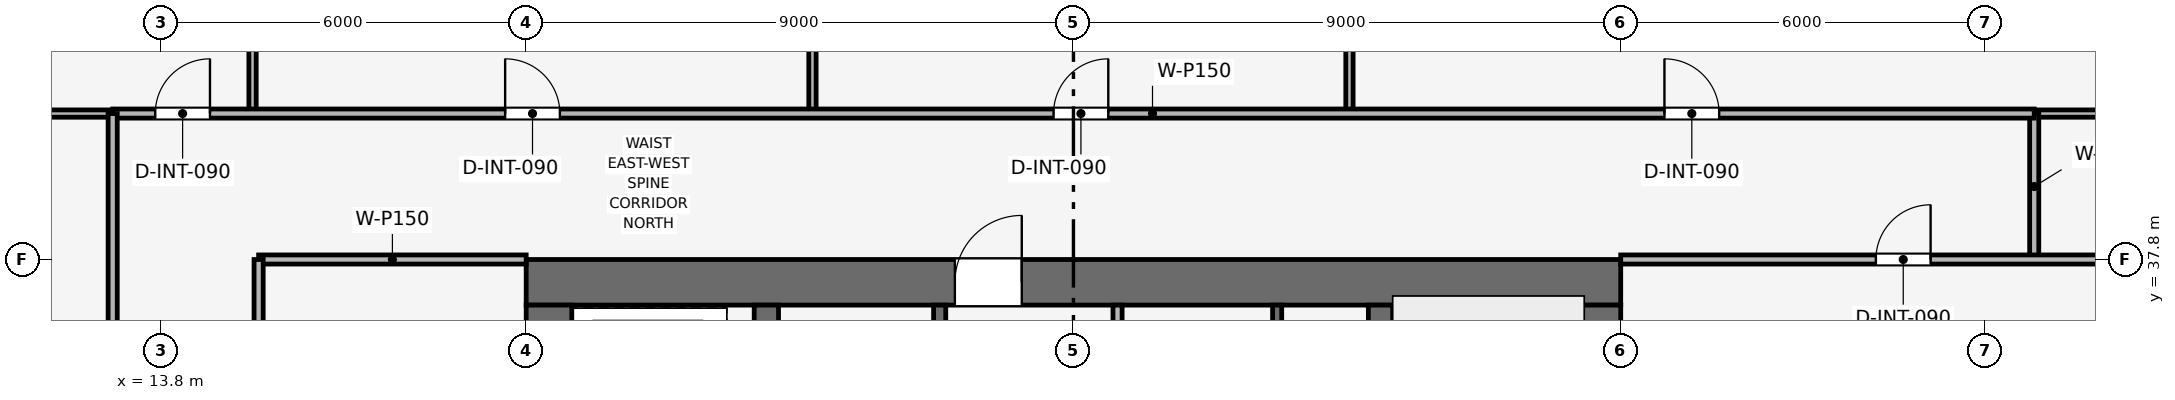
"""IFC4 building model, lengths in metres.
Left out: names, types, materials, properties, quantities, classifications, styles, units other than length and angle.
Written with IfcOpenShell. Run it as: python <this file> out.ifc"""

import sys

from ifc_helpers import new_model, si_unit, direction, frame, frame_2d, origin, place, context, subcontext, project, spatial, rectangle, extrude, element, fill, save


model = new_model("IFC4")
c1 = context("Model", 3, precision=1e-05, world=origin(), true_north=direction((0.0, 1.0)))
c2 = subcontext(c1, "Body", "Model", "MODEL_VIEW")
j1 = project(units=[si_unit("LENGTHUNIT", "METRE"), si_unit("PLANEANGLEUNIT", "RADIAN")], contexts=[c1])
p1 = place(None, origin())
s1 = spatial("IfcSite", under=j1, at=p1, CompositionType="ELEMENT")
p2 = place(p1, origin())
s2 = spatial("IfcBuilding", under=s1, at=p2, CompositionType="ELEMENT")
p3 = place(p2, frame((0.0, 0.0, 203.7)))
s3 = spatial("IfcBuildingStorey", under=s2, at=p3, CompositionType="ELEMENT", Elevation=203.7)
p4 = place(p3, frame((19.8, 37.425, 0.0), z_axis=(0.0, 0.0, 1.0), x_axis=(1.0, 0.0, 0.0)))
e1 = element("IfcWall", 1, at=p4, inside=s3, PredefinedType="SHEAR", context=c2, shape_type="SweptSolid", body=[
    extrude(rectangle(XDim=18.0, YDim=0.75, at=frame_2d((9.0, 0.0))), origin(), (0.0, 0.0, 1.0), 3.75),
])
p5 = place(p4, frame((7.05, 0.0, 0.0)))
e2 = element("IfcOpeningElement", 2, at=p5, cuts=e1, PredefinedType="OPENING", context=c2, shape_type="SweptSolid", body=[
    extrude(rectangle(XDim=1.1, YDim=2.15, at=frame_2d((0.55, 1.075))), frame((0.0, 0.385, 0.0), z_axis=(0.0, -1.0, 0.0), x_axis=(1.0, 0.0, 0.0)), (0.0, 0.0, 1.0), 0.77),
])
p6 = place(p3, frame((20.175, 20.55, 0.0), z_axis=(0.0, 0.0, 1.0), x_axis=(0.0, 1.0, 0.0)))
e3 = element("IfcWall", 3, at=p6, inside=s3, PredefinedType="SHEAR", context=c2, shape_type="SweptSolid", body=[
    extrude(rectangle(XDim=16.5, YDim=0.75, at=frame_2d((8.25, 0.0))), origin(), (0.0, 0.0, 1.0), 3.75),
])
p7 = place(p6, frame((10.25, 0.0, 0.0)))
e4 = element("IfcOpeningElement", 4, at=p7, cuts=e3, PredefinedType="OPENING", context=c2, shape_type="SweptSolid", body=[
    extrude(rectangle(XDim=1.1, YDim=2.15, at=frame_2d((0.55, 1.075))), frame((0.0, 0.385, 0.0), z_axis=(0.0, -1.0, 0.0), x_axis=(1.0, 0.0, 0.0)), (0.0, 0.0, 1.0), 0.77),
])
p8 = place(p3, frame((37.425, 20.55, 0.0), z_axis=(0.0, 0.0, 1.0), x_axis=(0.0, 1.0, 0.0)))
e5 = element("IfcWall", 5, at=p8, inside=s3, PredefinedType="SHEAR", context=c2, shape_type="SweptSolid", body=[
    extrude(rectangle(XDim=16.5, YDim=0.75, at=frame_2d((8.25, 0.0))), origin(), (0.0, 0.0, 1.0), 3.75),
])
p9 = place(p8, frame((4.75, 0.0, 0.0)))
e6 = element("IfcOpeningElement", 6, at=p9, cuts=e5, PredefinedType="OPENING", context=c2, shape_type="SweptSolid", body=[
    extrude(rectangle(XDim=1.1, YDim=2.15, at=frame_2d((0.55, 1.075))), frame((0.0, 0.385, 0.0), z_axis=(0.0, -1.0, 0.0), x_axis=(1.0, 0.0, 0.0)), (0.0, 0.0, 1.0), 0.77),
])
for number, where, z_axis, x_axis in (
    (7, (23.75, 20.55, 0.0), (0.0, 0.0, 1.0), (0.0, 1.0, 0.0)),
    (8, (33.85, 20.55, 0.0), (0.0, 0.0, 1.0), (0.0, 1.0, 0.0)),
):
    element("IfcWall", number, at=place(p3, frame(where, z_axis=z_axis, x_axis=x_axis)), inside=s3, PredefinedType="SHEAR", context=c2, shape_type="SweptSolid", body=[
        extrude(rectangle(XDim=16.5, YDim=0.4, at=frame_2d((8.25, 0.0))), origin(), (0.0, 0.0, 1.0), 3.75),
    ])
p10 = place(p3, frame((32.15, 34.0, 0.0), z_axis=(0.0, 0.0, 1.0), x_axis=(0.0, 1.0, 0.0)))
e9 = element("IfcWall", 9, at=p10, inside=s3, PredefinedType="SHEAR", context=c2, shape_type="SweptSolid", body=[
    extrude(rectangle(XDim=3.05, YDim=0.15, at=frame_2d((1.525, 0.0))), origin(), (0.0, 0.0, 1.0), 3.5),
])
p11 = place(p3, frame((26.6, 34.0, 0.0), z_axis=(0.0, 0.0, 1.0), x_axis=(0.0, 1.0, 0.0)))
e10 = element("IfcWall", 10, at=p11, inside=s3, PredefinedType="SHEAR", context=c2, shape_type="SweptSolid", body=[
    extrude(rectangle(XDim=3.05, YDim=0.2, at=frame_2d((1.525, 0.0))), origin(), (0.0, 0.0, 1.0), 3.5),
])
p12 = place(p11, frame((0.75, 0.0, 0.0)))
e11 = element("IfcOpeningElement", 11, at=p12, cuts=e10, PredefinedType="OPENING", context=c2, shape_type="SweptSolid", body=[
    extrude(rectangle(XDim=1.1, YDim=2.15, at=frame_2d((0.55, 1.075))), frame((0.0, 0.11, 0.0), z_axis=(0.0, -1.0, 0.0), x_axis=(1.0, 0.0, 0.0)), (0.0, 0.0, 1.0), 0.22),
])
p13 = place(p3, frame((29.525, 33.925, 0.0), z_axis=(0.0, 0.0, 1.0), x_axis=(0.0, 1.0, 0.0)))
e12 = element("IfcWall", 12, at=p13, inside=s3, PredefinedType="PARTITIONING", context=c2, shape_type="SweptSolid", body=[
    extrude(rectangle(XDim=3.125, YDim=0.15, at=frame_2d((1.562, 0.0))), origin(), (0.0, 0.0, 1.0), 3.5),
])
p14 = place(p13, frame((0.85, 0.0, 0.0)))
e13 = element("IfcOpeningElement", 13, at=p14, cuts=e12, PredefinedType="OPENING", context=c2, shape_type="SweptSolid", body=[
    extrude(rectangle(XDim=0.9, YDim=2.1, at=frame_2d((0.45, 1.05))), frame((0.0, 0.085, 0.0), z_axis=(0.0, -1.0, 0.0), x_axis=(1.0, 0.0, 0.0)), (0.0, 0.0, 1.0), 0.17),
])
p15 = place(p3, frame((15.4, 37.8, 0.0), z_axis=(0.0, 0.0, 1.0), x_axis=(1.0, 0.0, 0.0)))
e14 = element("IfcWall", 14, at=p15, inside=s3, PredefinedType="PARTITIONING", context=c2, shape_type="SweptSolid", body=[
    extrude(rectangle(XDim=4.4, YDim=0.15, at=frame_2d((2.2, 0.0))), origin(), (0.0, 0.0, 1.0), 3.035),
])
p16 = place(p3, frame((15.4, 32.45, 0.0), z_axis=(0.0, 0.0, 1.0), x_axis=(0.0, 1.0, 0.0)))
e15 = element("IfcWall", 15, at=p16, inside=s3, PredefinedType="PARTITIONING", context=c2, shape_type="SweptSolid", body=[
    extrude(rectangle(XDim=5.35, YDim=0.15, at=frame_2d((2.675, 0.0))), origin(), (0.0, 0.0, 1.0), 3.035),
])
p17 = place(p16, frame((2.1, 0.0, 0.0)))
e16 = element("IfcOpeningElement", 16, at=p17, cuts=e15, PredefinedType="OPENING", context=c2, shape_type="SweptSolid", body=[
    extrude(rectangle(XDim=0.9, YDim=2.1, at=frame_2d((0.45, 1.05))), frame((0.0, 0.085, 0.0), z_axis=(0.0, -1.0, 0.0), x_axis=(1.0, 0.0, 0.0)), (0.0, 0.0, 1.0), 0.17),
])
for number, where, z_axis, x_axis in (
    (17, (15.3, 40.2, 0.0), (0.0, 0.0, 1.0), (0.0, 1.0, 0.0)),
    (18, (24.508, 40.2, 0.0), (0.0, 0.0, 1.0), (0.0, 1.0, 0.0)),
    (19, (33.339, 40.2, 0.0), (0.0, 0.0, 1.0), (0.0, 1.0, 0.0)),
):
    element("IfcWall", number, at=place(p3, frame(where, z_axis=z_axis, x_axis=x_axis)), inside=s3, PredefinedType="PARTITIONING", context=c2, shape_type="SweptSolid", body=[
        extrude(rectangle(XDim=15.47, YDim=0.12, at=frame_2d((7.735, 0.0))), origin(), (0.0, 0.0, 1.0), 2.885),
    ])
p18 = place(p3, frame((1.93, 40.2, 0.0), z_axis=(0.0, 0.0, 1.0), x_axis=(1.0, 0.0, 0.0)))
e20 = element("IfcWall", 20, at=p18, inside=s3, PredefinedType="PARTITIONING", context=c2, shape_type="SweptSolid", body=[
    extrude(rectangle(XDim=11.07, YDim=0.12, at=frame_2d((5.535, 0.0))), origin(), (0.0, 0.0, 1.0), 2.885),
])
p19 = place(p3, frame((44.6, 40.2, 0.0), z_axis=(0.0, 0.0, 1.0), x_axis=(1.0, 0.0, 0.0)))
e21 = element("IfcWall", 21, at=p19, inside=s3, PredefinedType="PARTITIONING", context=c2, shape_type="SweptSolid", body=[
    extrude(rectangle(XDim=11.07, YDim=0.12, at=frame_2d((5.535, 0.0))), origin(), (0.0, 0.0, 1.0), 2.885),
])
p20 = place(p3, frame((44.6, 37.8, 0.0), z_axis=(0.0, 0.0, 1.0), x_axis=(0.0, 1.0, 0.0)))
e22 = element("IfcWall", 22, at=p20, inside=s3, PredefinedType="PARTITIONING", context=c2, shape_type="SweptSolid", body=[
    extrude(rectangle(XDim=2.4, YDim=0.15, at=frame_2d((1.2, 0.0))), origin(), (0.0, 0.0, 1.0), 3.5),
])
p21 = place(p3, frame((37.8, 37.8, 0.0), z_axis=(0.0, 0.0, 1.0), x_axis=(1.0, 0.0, 0.0)))
e23 = element("IfcWall", 23, at=p21, inside=s3, PredefinedType="PARTITIONING", context=c2, shape_type="SweptSolid", body=[
    extrude(rectangle(XDim=17.87, YDim=0.15, at=frame_2d((8.935, 0.0))), origin(), (0.0, 0.0, 1.0), 2.885),
])
p22 = place(p21, frame((4.196, 0.0, 0.0)))
e24 = element("IfcOpeningElement", 24, at=p22, cuts=e23, PredefinedType="OPENING", context=c2, shape_type="SweptSolid", body=[
    extrude(rectangle(XDim=0.9, YDim=2.1, at=frame_2d((0.45, 1.05))), frame((0.0, 0.085, 0.0), z_axis=(0.0, -1.0, 0.0), x_axis=(1.0, 0.0, 0.0)), (0.0, 0.0, 1.0), 0.17),
])
p23 = place(p3, frame((13.0, 40.2, 0.0), z_axis=(0.0, 0.0, 1.0), x_axis=(1.0, 0.0, 0.0)))
e25 = element("IfcWall", 25, at=p23, inside=s3, PredefinedType="PARTITIONING", context=c2, shape_type="SweptSolid", body=[
    extrude(rectangle(XDim=31.6, YDim=0.15, at=frame_2d((15.8, 0.0))), origin(), (0.0, 0.0, 1.0), 3.035),
])
p24 = place(p23, frame((0.7, 0.0, 0.0)))
e26 = element("IfcOpeningElement", 26, at=p24, cuts=e25, PredefinedType="OPENING", context=c2, shape_type="SweptSolid", body=[
    extrude(rectangle(XDim=0.9, YDim=2.1, at=frame_2d((0.45, 1.05))), frame((0.0, 0.085, 0.0), z_axis=(0.0, -1.0, 0.0), x_axis=(1.0, 0.0, 0.0)), (0.0, 0.0, 1.0), 0.17),
])
p25 = place(p23, frame((6.454, 0.0, 0.0)))
e27 = element("IfcOpeningElement", 27, at=p25, cuts=e25, PredefinedType="OPENING", context=c2, shape_type="SweptSolid", body=[
    extrude(rectangle(XDim=0.9, YDim=2.1, at=frame_2d((0.45, 1.05))), frame((0.0, 0.085, 0.0), z_axis=(0.0, -1.0, 0.0), x_axis=(1.0, 0.0, 0.0)), (0.0, 0.0, 1.0), 0.17),
])
p26 = place(p23, frame((15.473, 0.0, 0.0)))
e28 = element("IfcOpeningElement", 28, at=p26, cuts=e25, PredefinedType="OPENING", context=c2, shape_type="SweptSolid", body=[
    extrude(rectangle(XDim=0.9, YDim=2.1, at=frame_2d((0.45, 1.05))), frame((0.0, 0.085, 0.0), z_axis=(0.0, -1.0, 0.0), x_axis=(1.0, 0.0, 0.0)), (0.0, 0.0, 1.0), 0.17),
])
p27 = place(p23, frame((25.519, 0.0, 0.0)))
e29 = element("IfcOpeningElement", 29, at=p27, cuts=e25, PredefinedType="OPENING", context=c2, shape_type="SweptSolid", body=[
    extrude(rectangle(XDim=0.9, YDim=2.1, at=frame_2d((0.45, 1.05))), frame((0.0, 0.085, 0.0), z_axis=(0.0, -1.0, 0.0), x_axis=(1.0, 0.0, 0.0)), (0.0, 0.0, 1.0), 0.17),
])
p28 = place(p3, frame((13.0, 17.4, 0.0), z_axis=(0.0, 0.0, 1.0), x_axis=(0.0, 1.0, 0.0)))
e30 = element("IfcWall", 30, at=p28, inside=s3, PredefinedType="PARTITIONING", context=c2, shape_type="SweptSolid", body=[
    extrude(rectangle(XDim=22.8, YDim=0.15, at=frame_2d((11.4, 0.0))), origin(), (0.0, 0.0, 1.0), 3.035),
])
p29 = place(p28, frame((4.641, 0.0, 0.0)))
e31 = element("IfcOpeningElement", 31, at=p29, cuts=e30, PredefinedType="OPENING", context=c2, shape_type="SweptSolid", body=[
    extrude(rectangle(XDim=0.9, YDim=2.1, at=frame_2d((0.45, 1.05))), frame((0.0, 0.085, 0.0), z_axis=(0.0, -1.0, 0.0), x_axis=(1.0, 0.0, 0.0)), (0.0, 0.0, 1.0), 0.17),
])
p30 = place(p28, frame((13.641, 0.0, 0.0)))
e32 = element("IfcOpeningElement", 32, at=p30, cuts=e30, PredefinedType="OPENING", context=c2, shape_type="SweptSolid", body=[
    extrude(rectangle(XDim=0.9, YDim=2.1, at=frame_2d((0.45, 1.05))), frame((0.0, 0.085, 0.0), z_axis=(0.0, -1.0, 0.0), x_axis=(1.0, 0.0, 0.0)), (0.0, 0.0, 1.0), 0.17),
])
p31 = place(p22, origin())
e33 = element("IfcDoor", 33, at=p31, inside=s3, OperationType="SINGLE_SWING_RIGHT", PredefinedType="DOOR", context=c2, shape_type="SweptSolid", body=[
    extrude(rectangle(XDim=0.9, YDim=2.1, at=frame_2d((0.45, 1.05))), frame((0.0, 0.025, 0.0), z_axis=(0.0, -1.0, 0.0), x_axis=(1.0, 0.0, 0.0)), (0.0, 0.0, 1.0), 0.05),
])
fill(e24, e33)
p32 = place(p24, origin())
e34 = element("IfcDoor", 34, at=p32, inside=s3, OperationType="SINGLE_SWING_RIGHT", PredefinedType="DOOR", context=c2, shape_type="SweptSolid", body=[
    extrude(rectangle(XDim=0.9, YDim=2.1, at=frame_2d((0.45, 1.05))), frame((0.0, 0.025, 0.0), z_axis=(0.0, -1.0, 0.0), x_axis=(1.0, 0.0, 0.0)), (0.0, 0.0, 1.0), 0.05),
])
fill(e26, e34)
p33 = place(p25, origin())
e35 = element("IfcDoor", 35, at=p33, inside=s3, OperationType="SINGLE_SWING_LEFT", PredefinedType="DOOR", context=c2, shape_type="SweptSolid", body=[
    extrude(rectangle(XDim=0.9, YDim=2.1, at=frame_2d((0.45, 1.05))), frame((0.0, 0.025, 0.0), z_axis=(0.0, -1.0, 0.0), x_axis=(1.0, 0.0, 0.0)), (0.0, 0.0, 1.0), 0.05),
])
fill(e27, e35)
p34 = place(p26, origin())
e36 = element("IfcDoor", 36, at=p34, inside=s3, OperationType="SINGLE_SWING_RIGHT", PredefinedType="DOOR", context=c2, shape_type="SweptSolid", body=[
    extrude(rectangle(XDim=0.9, YDim=2.1, at=frame_2d((0.45, 1.05))), frame((0.0, 0.025, 0.0), z_axis=(0.0, -1.0, 0.0), x_axis=(1.0, 0.0, 0.0)), (0.0, 0.0, 1.0), 0.05),
])
fill(e28, e36)
p35 = place(p27, origin())
e37 = element("IfcDoor", 37, at=p35, inside=s3, OperationType="SINGLE_SWING_LEFT", PredefinedType="DOOR", context=c2, shape_type="SweptSolid", body=[
    extrude(rectangle(XDim=0.9, YDim=2.1, at=frame_2d((0.45, 1.05))), frame((0.0, 0.025, 0.0), z_axis=(0.0, -1.0, 0.0), x_axis=(1.0, 0.0, 0.0)), (0.0, 0.0, 1.0), 0.05),
])
fill(e29, e37)
p36 = place(p5, origin())
e38 = element("IfcDoor", 38, at=p36, inside=s3, OperationType="SINGLE_SWING_RIGHT", PredefinedType="DOOR", context=c2, shape_type="SweptSolid", body=[
    extrude(rectangle(XDim=1.1, YDim=2.15, at=frame_2d((0.55, 1.075))), frame((0.0, 0.025, 0.0), z_axis=(0.0, -1.0, 0.0), x_axis=(1.0, 0.0, 0.0)), (0.0, 0.0, 1.0), 0.05),
])
fill(e2, e38)
save(model, sys.argv[1])
